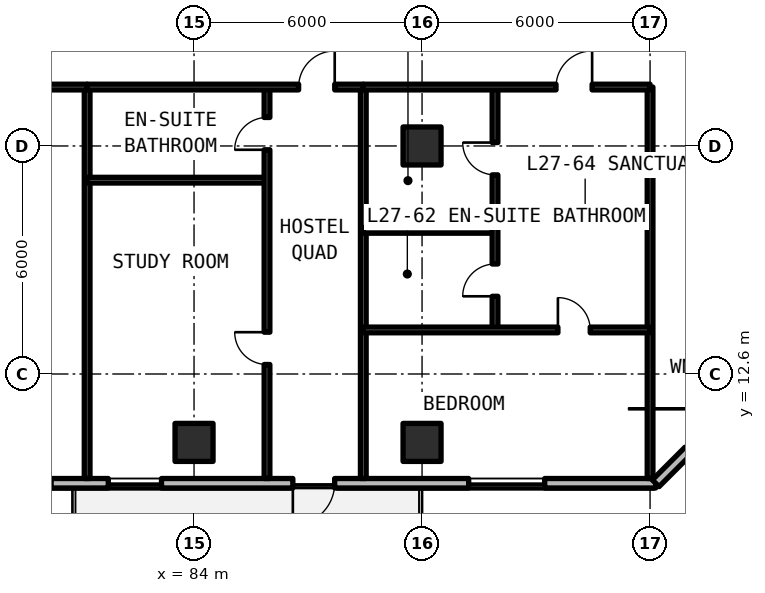
"""IFC4 building model, lengths in metres.
Left out: names, types, materials, properties, quantities, classifications, styles, units other than length and angle.
Written with IfcOpenShell. Run it as: python <this file> out.ifc"""

import sys

from ifc_helpers import new_model, si_unit, direction, frame, frame_2d, origin, origin_2d, place, context, subcontext, project, spatial, rectangle, extrude, element, fill, save


model = new_model("IFC4")
c1 = context("Model", 3, precision=1e-05, world=origin(), true_north=direction((0.0, 1.0)))
c2 = subcontext(c1, "Body", "Model", "MODEL_VIEW")
j1 = project(units=[si_unit("LENGTHUNIT", "METRE"), si_unit("PLANEANGLEUNIT", "RADIAN")], contexts=[c1])
p1 = place(None, origin())
s1 = spatial("IfcSite", under=j1, at=p1, CompositionType="ELEMENT")
p2 = place(p1, origin())
s2 = spatial("IfcBuilding", under=s1, at=p2, CompositionType="ELEMENT")
p3 = place(p2, frame((0.0, 0.0, 98.67)))
s3 = spatial("IfcBuildingStorey", under=s2, at=p3, CompositionType="ELEMENT", Elevation=98.67)
for number, where, z_axis, x_axis in (
    (1, (90.0, 18.6, 0.0), (0.0, 0.0, 1.0), (1.0, 0.0, 0.0)),
    (2, (84.0, 10.8, 0.0), (0.0, 0.0, 1.0), (1.0, 0.0, 0.0)),
    (3, (90.0, 10.8, 0.0), (0.0, 0.0, 1.0), (1.0, 0.0, 0.0)),
):
    element("IfcColumn", number, at=place(p3, frame(where, z_axis=z_axis, x_axis=x_axis)), inside=s3, PredefinedType="COLUMN", context=c2, shape_type="SweptSolid", body=[
        extrude(rectangle(XDim=1.0, YDim=1.0, at=origin_2d()), origin(), (0.0, 0.0, 1.0), 3.3),
    ])
p4 = place(p3, frame((52.125, 9.725, 0.0), z_axis=(0.0, 0.0, 1.0), x_axis=(1.0, 0.0, 0.0)))
e4 = element("IfcWall", 4, at=p4, inside=s3, PredefinedType="SOLIDWALL", context=c2, shape_type="SweptSolid", body=[
    extrude(rectangle(XDim=44.023, YDim=0.25, at=frame_2d((22.012, 0.0))), origin(), (0.0, 0.0, 1.0), 3.08),
])
p5 = place(p4, frame((10.525, 0.0, 0.0)))
e5 = element("IfcOpeningElement", 5, at=p5, cuts=e4, PredefinedType="OPENING", context=c2, shape_type="SweptSolid", body=[
    extrude(rectangle(XDim=1.1, YDim=2.15, at=frame_2d((0.55, 1.075))), frame((0.0, 0.135, 0.0), z_axis=(0.0, -1.0, 0.0), x_axis=(1.0, 0.0, 0.0)), (0.0, 0.0, 1.0), 0.27),
])
p6 = place(p4, frame((22.125, 0.0, 0.0)))
e6 = element("IfcOpeningElement", 6, at=p6, cuts=e4, PredefinedType="OPENING", context=c2, shape_type="SweptSolid", body=[
    extrude(rectangle(XDim=1.1, YDim=2.15, at=frame_2d((0.55, 1.075))), frame((0.0, 0.135, 0.0), z_axis=(0.0, -1.0, 0.0), x_axis=(1.0, 0.0, 0.0)), (0.0, 0.0, 1.0), 0.27),
])
p7 = place(p4, frame((34.475, 0.0, 0.0)))
e7 = element("IfcOpeningElement", 7, at=p7, cuts=e4, PredefinedType="OPENING", context=c2, shape_type="SweptSolid", body=[
    extrude(rectangle(XDim=1.1, YDim=2.15, at=frame_2d((0.55, 1.075))), frame((0.0, 0.135, 0.0), z_axis=(0.0, -1.0, 0.0), x_axis=(1.0, 0.0, 0.0)), (0.0, 0.0, 1.0), 0.27),
])
p8 = place(p4, frame((2.669, 0.0, 0.78)))
e8 = element("IfcOpeningElement", 8, at=p8, cuts=e4, PredefinedType="OPENING", context=c2, shape_type="SweptSolid", body=[
    extrude(rectangle(XDim=2.0, YDim=1.66, at=frame_2d((1.0, 0.83))), frame((0.0, 0.135, 0.0), z_axis=(0.0, -1.0, 0.0), x_axis=(1.0, 0.0, 0.0)), (0.0, 0.0, 1.0), 0.27),
])
p9 = place(p4, frame((8.314, 0.0, 0.78)))
e9 = element("IfcOpeningElement", 9, at=p9, cuts=e4, PredefinedType="OPENING", context=c2, shape_type="SweptSolid", body=[
    extrude(rectangle(XDim=0.85, YDim=1.65, at=frame_2d((0.425, 0.825))), frame((0.0, 0.135, 0.0), z_axis=(0.0, -1.0, 0.0), x_axis=(1.0, 0.0, 0.0)), (0.0, 0.0, 1.0), 0.27),
])
p10 = place(p4, frame((15.009, 0.0, 0.78)))
e10 = element("IfcOpeningElement", 10, at=p10, cuts=e4, PredefinedType="OPENING", context=c2, shape_type="SweptSolid", body=[
    extrude(rectangle(XDim=0.85, YDim=1.65, at=frame_2d((0.425, 0.825))), frame((0.0, 0.135, 0.0), z_axis=(0.0, -1.0, 0.0), x_axis=(1.0, 0.0, 0.0)), (0.0, 0.0, 1.0), 0.27),
])
p11 = place(p4, frame((17.708, 0.0, 0.78)))
e11 = element("IfcOpeningElement", 11, at=p11, cuts=e4, PredefinedType="OPENING", context=c2, shape_type="SweptSolid", body=[
    extrude(rectangle(XDim=1.4, YDim=1.65, at=frame_2d((0.7, 0.825))), frame((0.0, 0.135, 0.0), z_axis=(0.0, -1.0, 0.0), x_axis=(1.0, 0.0, 0.0)), (0.0, 0.0, 1.0), 0.27),
])
p12 = place(p4, frame((26.714, 0.0, 0.78)))
e12 = element("IfcOpeningElement", 12, at=p12, cuts=e4, PredefinedType="OPENING", context=c2, shape_type="SweptSolid", body=[
    extrude(rectangle(XDim=1.4, YDim=1.65, at=frame_2d((0.7, 0.825))), frame((0.0, 0.135, 0.0), z_axis=(0.0, -1.0, 0.0), x_axis=(1.0, 0.0, 0.0)), (0.0, 0.0, 1.0), 0.27),
])
p13 = place(p4, frame((29.618, 0.0, 0.78)))
e13 = element("IfcOpeningElement", 13, at=p13, cuts=e4, PredefinedType="OPENING", context=c2, shape_type="SweptSolid", body=[
    extrude(rectangle(XDim=1.4, YDim=1.65, at=frame_2d((0.7, 0.825))), frame((0.0, 0.135, 0.0), z_axis=(0.0, -1.0, 0.0), x_axis=(1.0, 0.0, 0.0)), (0.0, 0.0, 1.0), 0.27),
])
p14 = place(p4, frame((39.102, 0.0, 0.78)))
e14 = element("IfcOpeningElement", 14, at=p14, cuts=e4, PredefinedType="OPENING", context=c2, shape_type="SweptSolid", body=[
    extrude(rectangle(XDim=2.0, YDim=1.66, at=frame_2d((1.0, 0.83))), frame((0.0, 0.135, 0.0), z_axis=(0.0, -1.0, 0.0), x_axis=(1.0, 0.0, 0.0)), (0.0, 0.0, 1.0), 0.27),
])
p15 = place(p3, frame((96.148, 9.725, 0.0), z_axis=(0.0, 0.0, 1.0), x_axis=(0.707106781187, 0.707106781187, 0.0)))
e15 = element("IfcWall", 15, at=p15, inside=s3, PredefinedType="SOLIDWALL", context=c2, shape_type="SweptSolid", body=[
    extrude(rectangle(XDim=5.836, YDim=0.25, at=frame_2d((2.918, 0.0))), origin(), (0.0, 0.0, 1.0), 3.08),
])
p16 = place(p15, frame((1.218, 0.0, 0.78)))
e16 = element("IfcOpeningElement", 16, at=p16, cuts=e15, PredefinedType="OPENING", context=c2, shape_type="SweptSolid", body=[
    extrude(rectangle(XDim=3.4, YDim=1.66, at=frame_2d((1.7, 0.83))), frame((0.0, 0.135, 0.0), z_axis=(0.0, -1.0, 0.0), x_axis=(1.0, 0.0, 0.0)), (0.0, 0.0, 1.0), 0.27),
])
for number, where, z_axis, x_axis in (
    (17, (96.0, 9.85, 0.0), (0.0, 0.0, 1.0), (0.0, 1.0, 0.0)),
    (18, (81.187, 9.85, 0.0), (0.0, 0.0, 1.0), (0.0, 1.0, 0.0)),
):
    element("IfcWall", number, at=place(p3, frame(where, z_axis=z_axis, x_axis=x_axis)), inside=s3, PredefinedType="SOLIDWALL", context=c2, shape_type="SweptSolid", body=[
        extrude(rectangle(XDim=10.3, YDim=0.15, at=frame_2d((5.15, 0.0))), origin(), (0.0, 0.0, 1.0), 2.35),
    ])
p17 = place(p3, frame((73.641, 20.15, 0.0), z_axis=(0.0, 0.0, 1.0), x_axis=(1.0, 0.0, 0.0)))
e19 = element("IfcWall", 19, at=p17, inside=s3, PredefinedType="SOLIDWALL", context=c2, shape_type="SweptSolid", body=[
    extrude(rectangle(XDim=7.546, YDim=0.15, at=frame_2d((3.773, 0.0))), origin(), (0.0, 0.0, 1.0), 2.35),
])
p18 = place(p17, frame((4.513, 0.0, 0.0)))
e20 = element("IfcOpeningElement", 20, at=p18, cuts=e19, PredefinedType="OPENING", context=c2, shape_type="SweptSolid", body=[
    extrude(rectangle(XDim=0.95, YDim=2.15, at=frame_2d((0.475, 1.075))), frame((0.0, 0.085, 0.0), z_axis=(0.0, -1.0, 0.0), x_axis=(1.0, 0.0, 0.0)), (0.0, 0.0, 1.0), 0.17),
])
p19 = place(p3, frame((88.454, 9.85, 0.0), z_axis=(0.0, 0.0, 1.0), x_axis=(0.0, 1.0, 0.0)))
e21 = element("IfcWall", 21, at=p19, inside=s3, PredefinedType="SOLIDWALL", context=c2, shape_type="SweptSolid", body=[
    extrude(rectangle(XDim=10.3, YDim=0.15, at=frame_2d((5.15, 0.0))), origin(), (0.0, 0.0, 1.0), 2.35),
])
p20 = place(p3, frame((81.187, 17.7, 0.0), z_axis=(0.0, 0.0, 1.0), x_axis=(1.0, 0.0, 0.0)))
e22 = element("IfcWall", 22, at=p20, inside=s3, PredefinedType="PARTITIONING", context=c2, shape_type="SweptSolid", body=[
    extrude(rectangle(XDim=4.733, YDim=0.15, at=frame_2d((2.366, 0.0))), origin(), (0.0, 0.0, 1.0), 2.35),
])
p21 = place(p3, frame((85.92, 9.85, 0.0), z_axis=(0.0, 0.0, 1.0), x_axis=(0.0, 1.0, 0.0)))
e23 = element("IfcWall", 23, at=p21, inside=s3, PredefinedType="PARTITIONING", context=c2, shape_type="SweptSolid", body=[
    extrude(rectangle(XDim=10.3, YDim=0.15, at=frame_2d((5.15, 0.0))), origin(), (0.0, 0.0, 1.0), 2.35),
])
p22 = place(p21, frame((3.0, 0.0, 0.0)))
e24 = element("IfcOpeningElement", 24, at=p22, cuts=e23, PredefinedType="OPENING", context=c2, shape_type="SweptSolid", body=[
    extrude(rectangle(XDim=0.85, YDim=2.1, at=frame_2d((0.425, 1.05))), frame((0.0, 0.085, 0.0), z_axis=(0.0, -1.0, 0.0), x_axis=(1.0, 0.0, 0.0)), (0.0, 0.0, 1.0), 0.17),
])
p23 = place(p21, frame((8.65, 0.0, 0.0)))
e25 = element("IfcOpeningElement", 25, at=p23, cuts=e23, PredefinedType="OPENING", context=c2, shape_type="SweptSolid", body=[
    extrude(rectangle(XDim=0.85, YDim=2.1, at=frame_2d((0.425, 1.05))), frame((0.0, 0.085, 0.0), z_axis=(0.0, -1.0, 0.0), x_axis=(1.0, 0.0, 0.0)), (0.0, 0.0, 1.0), 0.17),
])
p24 = place(p3, frame((81.187, 20.15, 0.0), z_axis=(0.0, 0.0, 1.0), x_axis=(1.0, 0.0, 0.0)))
e26 = element("IfcWall", 26, at=p24, inside=s3, PredefinedType="SOLIDWALL", context=c2, shape_type="SweptSolid", body=[
    extrude(rectangle(XDim=7.267, YDim=0.15, at=frame_2d((3.633, 0.0))), origin(), (0.0, 0.0, 1.0), 2.35),
])
p25 = place(p24, frame((5.565, 0.0, 0.0)))
e27 = element("IfcOpeningElement", 27, at=p25, cuts=e26, PredefinedType="OPENING", context=c2, shape_type="SweptSolid", body=[
    extrude(rectangle(XDim=0.95, YDim=2.15, at=frame_2d((0.475, 1.075))), frame((0.0, 0.085, 0.0), z_axis=(0.0, -1.0, 0.0), x_axis=(1.0, 0.0, 0.0)), (0.0, 0.0, 1.0), 0.17),
])
p26 = place(p3, frame((88.454, 16.379, 0.0), z_axis=(0.0, 0.0, 1.0), x_axis=(1.0, 0.0, 0.0)))
e28 = element("IfcWall", 28, at=p26, inside=s3, PredefinedType="PARTITIONING", context=c2, shape_type="SweptSolid", body=[
    extrude(rectangle(XDim=3.466, YDim=0.15, at=frame_2d((1.733, 0.0))), origin(), (0.0, 0.0, 1.0), 2.35),
])
p27 = place(p3, frame((91.92, 13.759, 0.0), z_axis=(0.0, 0.0, 1.0), x_axis=(0.0, 1.0, 0.0)))
e29 = element("IfcWall", 29, at=p27, inside=s3, PredefinedType="PARTITIONING", context=c2, shape_type="SweptSolid", body=[
    extrude(rectangle(XDim=6.391, YDim=0.15, at=frame_2d((3.195, 0.0))), origin(), (0.0, 0.0, 1.0), 2.35),
])
p28 = place(p27, frame((0.885, 0.0, 0.0)))
e30 = element("IfcOpeningElement", 30, at=p28, cuts=e29, PredefinedType="OPENING", context=c2, shape_type="SweptSolid", body=[
    extrude(rectangle(XDim=0.85, YDim=2.1, at=frame_2d((0.425, 1.05))), frame((0.0, 0.085, 0.0), z_axis=(0.0, -1.0, 0.0), x_axis=(1.0, 0.0, 0.0)), (0.0, 0.0, 1.0), 0.17),
])
p29 = place(p27, frame((4.08, 0.0, 0.0)))
e31 = element("IfcOpeningElement", 31, at=p29, cuts=e29, PredefinedType="OPENING", context=c2, shape_type="SweptSolid", body=[
    extrude(rectangle(XDim=0.85, YDim=2.1, at=frame_2d((0.425, 1.05))), frame((0.0, 0.085, 0.0), z_axis=(0.0, -1.0, 0.0), x_axis=(1.0, 0.0, 0.0)), (0.0, 0.0, 1.0), 0.17),
])
p30 = place(p3, frame((88.454, 13.759, 0.0), z_axis=(0.0, 0.0, 1.0), x_axis=(1.0, 0.0, 0.0)))
e32 = element("IfcWall", 32, at=p30, inside=s3, PredefinedType="PARTITIONING", context=c2, shape_type="SweptSolid", body=[
    extrude(rectangle(XDim=7.546, YDim=0.15, at=frame_2d((3.773, 0.0))), origin(), (0.0, 0.0, 1.0), 2.35),
])
p31 = place(p30, frame((5.121, 0.0, 0.0)))
e33 = element("IfcOpeningElement", 33, at=p31, cuts=e32, PredefinedType="OPENING", context=c2, shape_type="SweptSolid", body=[
    extrude(rectangle(XDim=0.85, YDim=2.1, at=frame_2d((0.425, 1.05))), frame((0.0, 0.085, 0.0), z_axis=(0.0, -1.0, 0.0), x_axis=(1.0, 0.0, 0.0)), (0.0, 0.0, 1.0), 0.17),
])
p32 = place(p3, frame((88.454, 20.15, 0.0), z_axis=(0.0, 0.0, 1.0), x_axis=(1.0, 0.0, 0.0)))
e34 = element("IfcWall", 34, at=p32, inside=s3, PredefinedType="SOLIDWALL", context=c2, shape_type="SweptSolid", body=[
    extrude(rectangle(XDim=7.546, YDim=0.15, at=frame_2d((3.773, 0.0))), origin(), (0.0, 0.0, 1.0), 2.35),
])
p33 = place(p32, frame((5.071, 0.0, 0.0)))
e35 = element("IfcOpeningElement", 35, at=p33, cuts=e34, PredefinedType="OPENING", context=c2, shape_type="SweptSolid", body=[
    extrude(rectangle(XDim=0.95, YDim=2.15, at=frame_2d((0.475, 1.075))), frame((0.0, 0.085, 0.0), z_axis=(0.0, -1.0, 0.0), x_axis=(1.0, 0.0, 0.0)), (0.0, 0.0, 1.0), 0.17),
])
p34 = place(p7, frame((1.1, 0.0, 0.0), z_axis=(0.0, 0.0, 1.0), x_axis=(-1.0, 0.0, 0.0)))
e36 = element("IfcDoor", 36, at=p34, inside=s3, OperationType="SINGLE_SWING_LEFT", PredefinedType="DOOR", context=c2, shape_type="SweptSolid", body=[
    extrude(rectangle(XDim=1.1, YDim=2.15, at=frame_2d((0.55, 1.075))), frame((0.0, 0.025, 0.0), z_axis=(0.0, -1.0, 0.0), x_axis=(1.0, 0.0, 0.0)), (0.0, 0.0, 1.0), 0.05),
])
fill(e7, e36)
p35 = place(p13, origin())
e37 = element("IfcWindow", 37, at=p35, inside=s3, PartitioningType="SINGLE_PANEL", PredefinedType="WINDOW", context=c2, shape_type="SweptSolid", body=[
    extrude(rectangle(XDim=1.4, YDim=1.65, at=frame_2d((0.7, 0.825))), frame((0.0, 0.03, 0.0), z_axis=(0.0, -1.0, 0.0), x_axis=(1.0, 0.0, 0.0)), (0.0, 0.0, 1.0), 0.06),
])
fill(e13, e37)
p36 = place(p14, origin())
e38 = element("IfcWindow", 38, at=p36, inside=s3, PartitioningType="SINGLE_PANEL", PredefinedType="WINDOW", context=c2, shape_type="SweptSolid", body=[
    extrude(rectangle(XDim=2.0, YDim=1.66, at=frame_2d((1.0, 0.83))), frame((0.0, 0.03, 0.0), z_axis=(0.0, -1.0, 0.0), x_axis=(1.0, 0.0, 0.0)), (0.0, 0.0, 1.0), 0.06),
])
fill(e14, e38)
p37 = place(p22, origin())
e39 = element("IfcDoor", 39, at=p37, inside=s3, OperationType="SINGLE_SWING_RIGHT", PredefinedType="DOOR", context=c2, shape_type="SweptSolid", body=[
    extrude(rectangle(XDim=0.85, YDim=2.1, at=frame_2d((0.425, 1.05))), frame((0.0, 0.025, 0.0), z_axis=(0.0, -1.0, 0.0), x_axis=(1.0, 0.0, 0.0)), (0.0, 0.0, 1.0), 0.05),
])
fill(e24, e39)
p38 = place(p23, origin())
e40 = element("IfcDoor", 40, at=p38, inside=s3, OperationType="SINGLE_SWING_LEFT", PredefinedType="DOOR", context=c2, shape_type="SweptSolid", body=[
    extrude(rectangle(XDim=0.85, YDim=2.1, at=frame_2d((0.425, 1.05))), frame((0.0, 0.025, 0.0), z_axis=(0.0, -1.0, 0.0), x_axis=(1.0, 0.0, 0.0)), (0.0, 0.0, 1.0), 0.05),
])
fill(e25, e40)
p39 = place(p25, origin())
e41 = element("IfcDoor", 41, at=p39, inside=s3, OperationType="SINGLE_SWING_RIGHT", PredefinedType="DOOR", context=c2, shape_type="SweptSolid", body=[
    extrude(rectangle(XDim=0.95, YDim=2.15, at=frame_2d((0.475, 1.075))), frame((0.0, 0.025, 0.0), z_axis=(0.0, -1.0, 0.0), x_axis=(1.0, 0.0, 0.0)), (0.0, 0.0, 1.0), 0.05),
])
fill(e27, e41)
p40 = place(p28, origin())
e42 = element("IfcDoor", 42, at=p40, inside=s3, OperationType="SINGLE_SWING_LEFT", PredefinedType="DOOR", context=c2, shape_type="SweptSolid", body=[
    extrude(rectangle(XDim=0.85, YDim=2.1, at=frame_2d((0.425, 1.05))), frame((0.0, 0.025, 0.0), z_axis=(0.0, -1.0, 0.0), x_axis=(1.0, 0.0, 0.0)), (0.0, 0.0, 1.0), 0.05),
])
fill(e30, e42)
p41 = place(p29, origin())
e43 = element("IfcDoor", 43, at=p41, inside=s3, OperationType="SINGLE_SWING_RIGHT", PredefinedType="DOOR", context=c2, shape_type="SweptSolid", body=[
    extrude(rectangle(XDim=0.85, YDim=2.1, at=frame_2d((0.425, 1.05))), frame((0.0, 0.025, 0.0), z_axis=(0.0, -1.0, 0.0), x_axis=(1.0, 0.0, 0.0)), (0.0, 0.0, 1.0), 0.05),
])
fill(e31, e43)
p42 = place(p31, origin())
e44 = element("IfcDoor", 44, at=p42, inside=s3, OperationType="SINGLE_SWING_LEFT", PredefinedType="DOOR", context=c2, shape_type="SweptSolid", body=[
    extrude(rectangle(XDim=0.85, YDim=2.1, at=frame_2d((0.425, 1.05))), frame((0.0, 0.025, 0.0), z_axis=(0.0, -1.0, 0.0), x_axis=(1.0, 0.0, 0.0)), (0.0, 0.0, 1.0), 0.05),
])
fill(e33, e44)
p43 = place(p33, origin())
e45 = element("IfcDoor", 45, at=p43, inside=s3, OperationType="SINGLE_SWING_RIGHT", PredefinedType="DOOR", context=c2, shape_type="SweptSolid", body=[
    extrude(rectangle(XDim=0.95, YDim=2.15, at=frame_2d((0.475, 1.075))), frame((0.0, 0.025, 0.0), z_axis=(0.0, -1.0, 0.0), x_axis=(1.0, 0.0, 0.0)), (0.0, 0.0, 1.0), 0.05),
])
fill(e35, e45)
save(model, sys.argv[1])
